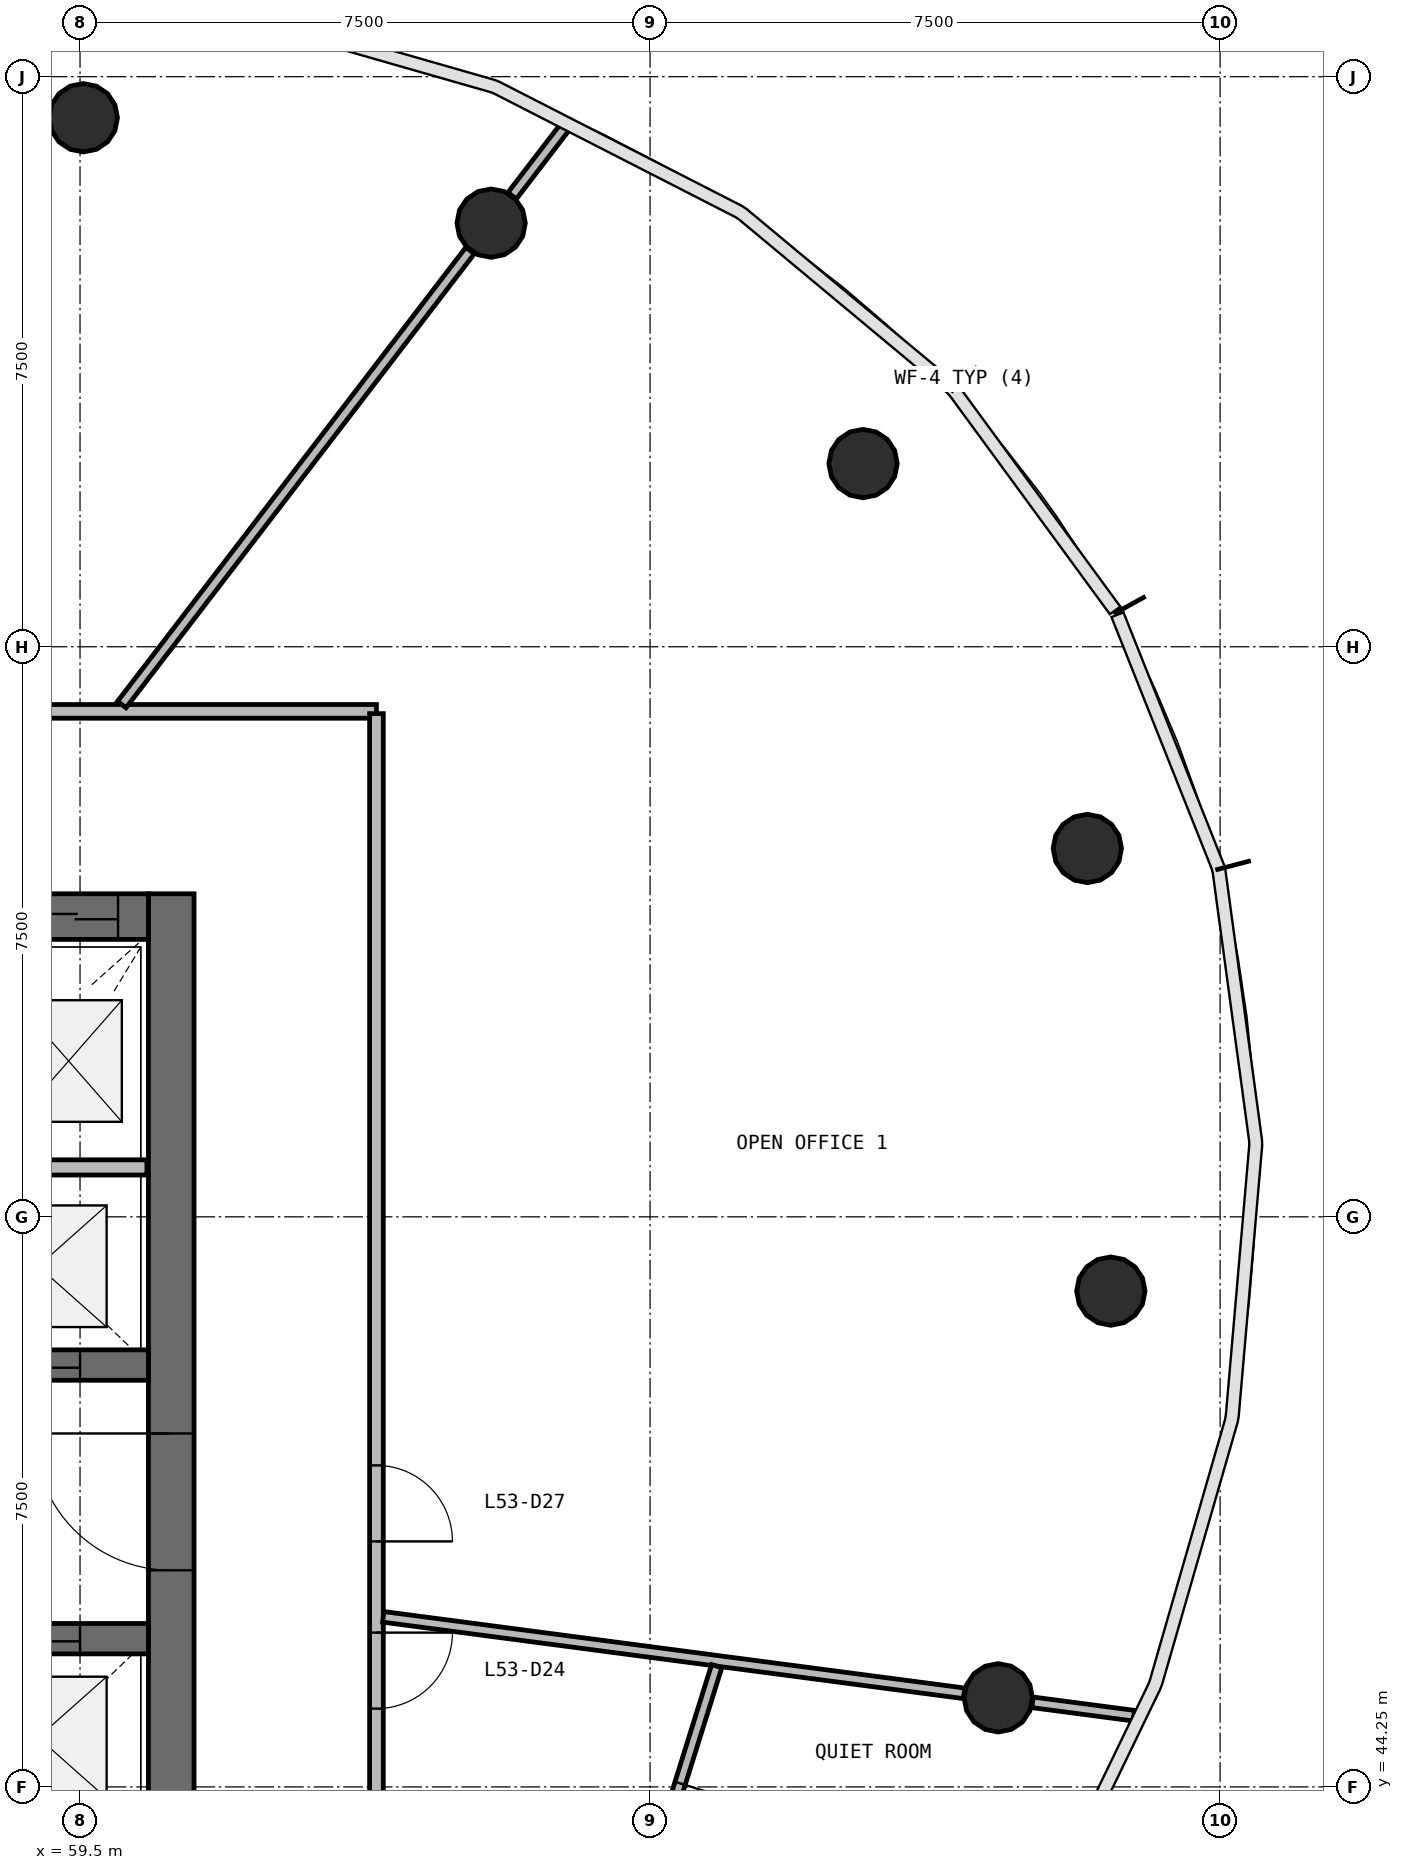
"""IFC4 building model, lengths in metres.
Left out: names, types, materials, properties, quantities, classifications, styles, units other than length and angle.
Written with IfcOpenShell. Run it as: python <this file> out.ifc"""

import sys

from ifc_helpers import new_model, si_unit, direction, frame, frame_2d, origin, origin_2d, place, context, subcontext, project, spatial, rectangle, circle, extrude, source, transform, mapped, element, fill, save


model = new_model("IFC4")
c1 = context("Model", 3, precision=1e-05, world=origin(), true_north=direction((0.0, 1.0)))
c2 = subcontext(c1, "Body", "Model", "MODEL_VIEW")
j1 = project(units=[si_unit("LENGTHUNIT", "METRE"), si_unit("PLANEANGLEUNIT", "RADIAN")], contexts=[c1])
p1 = place(None, origin())
s1 = spatial("IfcSite", under=j1, at=p1, CompositionType="ELEMENT")
p2 = place(p1, origin())
s2 = spatial("IfcBuilding", under=s1, at=p2, CompositionType="ELEMENT")
p3 = place(p2, frame((0.0, 0.0, 218.9)))
s3 = spatial("IfcBuildingStorey", under=s2, at=p3, CompositionType="ELEMENT", Elevation=218.9)
p4 = place(p3, frame((60.7, 40.0, 0.0), z_axis=(0.0, 0.0, 1.0), x_axis=(0.0, 1.0, 0.0)))
e1 = element("IfcWall", 1, at=p4, inside=s3, PredefinedType="SHEAR", context=c2, shape_type="SweptSolid", body=[
    extrude(rectangle(XDim=16.0, YDim=0.6, at=frame_2d((8.0, 0.0))), origin(), (0.0, 0.0, 1.0), 3.9),
])
p5 = place(p4, frame((7.1, 0.0, 0.0)))
e2 = element("IfcOpeningElement", 2, at=p5, cuts=e1, PredefinedType="OPENING", context=c2, shape_type="SweptSolid", body=[
    extrude(rectangle(XDim=1.8, YDim=2.1, at=frame_2d((0.9, 1.05))), frame((0.0, 0.31, 0.0), z_axis=(0.0, -1.0, 0.0), x_axis=(1.0, 0.0, 0.0)), (0.0, 0.0, 1.0), 0.62),
])
p6 = place(p3, frame((60.4, 55.7, 0.0), z_axis=(0.0, 0.0, 1.0), x_axis=(-1.0, 0.0, 0.0)))
e3 = element("IfcWall", 3, at=p6, inside=s3, PredefinedType="SHEAR", context=c2, shape_type="SweptSolid", body=[
    extrude(rectangle(XDim=16.8, YDim=0.6, at=frame_2d((8.4, 0.0))), origin(), (0.0, 0.0, 1.0), 3.9),
])
p7 = place(p6, frame((0.4, 0.0, 0.0)))
e4 = element("IfcOpeningElement", 4, at=p7, cuts=e3, PredefinedType="OPENING", context=c2, shape_type="SweptSolid", body=[
    extrude(rectangle(XDim=1.1, YDim=2.1, at=frame_2d((0.55, 1.05))), frame((0.0, 0.31, 0.0), z_axis=(0.0, -1.0, 0.0), x_axis=(1.0, 0.0, 0.0)), (0.0, 0.0, 1.0), 0.62),
])
p8 = place(p6, frame((10.3, 0.0, 0.0)))
e5 = element("IfcOpeningElement", 5, at=p8, cuts=e3, PredefinedType="OPENING", context=c2, shape_type="SweptSolid", body=[
    extrude(rectangle(XDim=1.2, YDim=2.1, at=frame_2d((0.6, 1.05))), frame((0.0, 0.31, 0.0), z_axis=(0.0, -1.0, 0.0), x_axis=(1.0, 0.0, 0.0)), (0.0, 0.0, 1.0), 0.62),
])
p9 = place(p6, frame((7.25, 0.0, 0.0)))
e6 = element("IfcOpeningElement", 6, at=p9, cuts=e3, PredefinedType="OPENING", context=c2, shape_type="SweptSolid", body=[
    extrude(rectangle(XDim=1.1, YDim=2.1, at=frame_2d((0.55, 1.05))), frame((0.0, 0.31, 0.0), z_axis=(0.0, -1.0, 0.0), x_axis=(1.0, 0.0, 0.0)), (0.0, 0.0, 1.0), 0.62),
])
p10 = place(p3, frame((43.6, 49.8, 0.0), z_axis=(0.0, 0.0, 1.0), x_axis=(1.0, 0.0, 0.0)))
e7 = element("IfcWall", 7, at=p10, inside=s3, PredefinedType="SHEAR", context=c2, shape_type="SweptSolid", body=[
    extrude(rectangle(XDim=16.8, YDim=0.4, at=frame_2d((8.4, 0.0))), origin(), (0.0, 0.0, 1.0), 3.9),
])
p11 = place(p10, frame((9.8, 0.0, 0.0)))
e8 = element("IfcOpeningElement", 8, at=p11, cuts=e7, PredefinedType="OPENING", context=c2, shape_type="SweptSolid", body=[
    extrude(rectangle(XDim=1.1, YDim=2.1, at=frame_2d((0.55, 1.05))), frame((0.0, 0.21, 0.0), z_axis=(0.0, -1.0, 0.0), x_axis=(1.0, 0.0, 0.0)), (0.0, 0.0, 1.0), 0.42),
])
p12 = place(p10, frame((12.3, 0.0, 0.0)))
e9 = element("IfcOpeningElement", 9, at=p12, cuts=e7, PredefinedType="OPENING", context=c2, shape_type="SweptSolid", body=[
    extrude(rectangle(XDim=1.1, YDim=2.1, at=frame_2d((0.55, 1.05))), frame((0.0, 0.21, 0.0), z_axis=(0.0, -1.0, 0.0), x_axis=(1.0, 0.0, 0.0)), (0.0, 0.0, 1.0), 0.42),
])
p13 = place(p10, frame((14.8, 0.0, 0.0)))
e10 = element("IfcOpeningElement", 10, at=p13, cuts=e7, PredefinedType="OPENING", context=c2, shape_type="SweptSolid", body=[
    extrude(rectangle(XDim=1.1, YDim=2.1, at=frame_2d((0.55, 1.05))), frame((0.0, 0.21, 0.0), z_axis=(0.0, -1.0, 0.0), x_axis=(1.0, 0.0, 0.0)), (0.0, 0.0, 1.0), 0.42),
])
p14 = place(p10, frame((2.05, 0.0, 0.0)))
e11 = element("IfcOpeningElement", 11, at=p14, cuts=e7, PredefinedType="OPENING", context=c2, shape_type="SweptSolid", body=[
    extrude(rectangle(XDim=0.9, YDim=2.1, at=frame_2d((0.45, 1.05))), frame((0.0, 0.21, 0.0), z_axis=(0.0, -1.0, 0.0), x_axis=(1.0, 0.0, 0.0)), (0.0, 0.0, 1.0), 0.42),
])
p15 = place(p10, frame((5.25, 0.0, 0.0)))
e12 = element("IfcOpeningElement", 12, at=p15, cuts=e7, PredefinedType="OPENING", context=c2, shape_type="SweptSolid", body=[
    extrude(rectangle(XDim=0.9, YDim=2.1, at=frame_2d((0.45, 1.05))), frame((0.0, 0.21, 0.0), z_axis=(0.0, -1.0, 0.0), x_axis=(1.0, 0.0, 0.0)), (0.0, 0.0, 1.0), 0.42),
])
p16 = place(p10, frame((7.85, 0.0, 0.0)))
e13 = element("IfcOpeningElement", 13, at=p16, cuts=e7, PredefinedType="OPENING", context=c2, shape_type="SweptSolid", body=[
    extrude(rectangle(XDim=0.9, YDim=2.1, at=frame_2d((0.45, 1.05))), frame((0.0, 0.21, 0.0), z_axis=(0.0, -1.0, 0.0), x_axis=(1.0, 0.0, 0.0)), (0.0, 0.0, 1.0), 0.42),
])
p17 = place(p3, frame((43.6, 46.2, 0.0), z_axis=(0.0, 0.0, 1.0), x_axis=(1.0, 0.0, 0.0)))
e14 = element("IfcWall", 14, at=p17, inside=s3, PredefinedType="SHEAR", context=c2, shape_type="SweptSolid", body=[
    extrude(rectangle(XDim=16.8, YDim=0.4, at=frame_2d((8.4, 0.0))), origin(), (0.0, 0.0, 1.0), 3.9),
])
p18 = place(p17, frame((9.8, 0.0, 0.0)))
e15 = element("IfcOpeningElement", 15, at=p18, cuts=e14, PredefinedType="OPENING", context=c2, shape_type="SweptSolid", body=[
    extrude(rectangle(XDim=1.1, YDim=2.1, at=frame_2d((0.55, 1.05))), frame((0.0, 0.21, 0.0), z_axis=(0.0, -1.0, 0.0), x_axis=(1.0, 0.0, 0.0)), (0.0, 0.0, 1.0), 0.42),
])
p19 = place(p17, frame((12.3, 0.0, 0.0)))
e16 = element("IfcOpeningElement", 16, at=p19, cuts=e14, PredefinedType="OPENING", context=c2, shape_type="SweptSolid", body=[
    extrude(rectangle(XDim=1.1, YDim=2.1, at=frame_2d((0.55, 1.05))), frame((0.0, 0.21, 0.0), z_axis=(0.0, -1.0, 0.0), x_axis=(1.0, 0.0, 0.0)), (0.0, 0.0, 1.0), 0.42),
])
p20 = place(p17, frame((14.8, 0.0, 0.0)))
e17 = element("IfcOpeningElement", 17, at=p20, cuts=e14, PredefinedType="OPENING", context=c2, shape_type="SweptSolid", body=[
    extrude(rectangle(XDim=1.1, YDim=2.1, at=frame_2d((0.55, 1.05))), frame((0.0, 0.21, 0.0), z_axis=(0.0, -1.0, 0.0), x_axis=(1.0, 0.0, 0.0)), (0.0, 0.0, 1.0), 0.42),
])
p21 = place(p17, frame((3.45, 0.0, 0.0)))
e18 = element("IfcOpeningElement", 18, at=p21, cuts=e14, PredefinedType="OPENING", context=c2, shape_type="SweptSolid", body=[
    extrude(rectangle(XDim=0.9, YDim=2.1, at=frame_2d((0.45, 1.05))), frame((0.0, 0.21, 0.0), z_axis=(0.0, -1.0, 0.0), x_axis=(1.0, 0.0, 0.0)), (0.0, 0.0, 1.0), 0.42),
])
p22 = place(p17, frame((7.85, 0.0, 0.0)))
e19 = element("IfcOpeningElement", 19, at=p22, cuts=e14, PredefinedType="OPENING", context=c2, shape_type="SweptSolid", body=[
    extrude(rectangle(XDim=0.9, YDim=2.1, at=frame_2d((0.45, 1.05))), frame((0.0, 0.21, 0.0), z_axis=(0.0, -1.0, 0.0), x_axis=(1.0, 0.0, 0.0)), (0.0, 0.0, 1.0), 0.42),
])
m1 = source(origin(), c2, "Body", "SweptSolid", [
    extrude(circle(Radius=0.45, at=origin_2d()), origin(), (0.0, 0.0, 1.0), 3.9),
])
for number, where, z_axis, x_axis in (
    (20, (73.062, 50.773, 0.0), (0.0, 0.0, 1.0), (1.0, 0.0, 0.0)),
    (21, (72.753, 56.596, 0.0), (0.0, 0.0, 1.0), (1.0, 0.0, 0.0)),
    (22, (69.802, 61.66, 0.0), (0.0, 0.0, 1.0), (1.0, 0.0, 0.0)),
    (23, (64.909, 64.823, 0.0), (0.0, 0.0, 1.0), (1.0, 0.0, 0.0)),
    (24, (59.543, 66.21, 0.0), (0.0, 0.0, 1.0), (1.0, 0.0, 0.0)),
    (25, (71.581, 45.422, 0.0), (0.0, 0.0, 1.0), (1.0, 0.0, 0.0)),
):
    element("IfcColumn", number, at=place(p3, frame(where, z_axis=z_axis, x_axis=x_axis)), inside=s3, PredefinedType="COLUMN", context=c2, shape_type="MappedRepresentation", body=[
        mapped(m1, transform((0.0, 0.0, 0.0), scale=1.0)),
    ])
p23 = place(p3, frame((60.38, 52.4, 0.0), z_axis=(0.0, 0.0, 1.0), x_axis=(-1.0, 0.0, 0.0)))
e26 = element("IfcWall", 26, at=p23, inside=s3, PredefinedType="SOLIDWALL", context=c2, shape_type="SweptSolid", body=[
    extrude(rectangle(XDim=1.85, YDim=0.2, at=frame_2d((0.925, 0.0))), origin(), (0.0, 0.0, 1.0), 3.58),
])
p24 = place(p3, frame((40.6, 58.4, 0.0), z_axis=(0.0, 0.0, 1.0), x_axis=(1.0, 0.0, 0.0)))
e27 = element("IfcWall", 27, at=p24, inside=s3, PredefinedType="PARTITIONING", context=c2, shape_type="SweptSolid", body=[
    extrude(rectangle(XDim=22.8, YDim=0.18, at=frame_2d((11.4, 0.0))), origin(), (0.0, 0.0, 1.0), 2.88),
])
p25 = place(p24, frame((10.95, 0.0, 0.0)))
e28 = element("IfcOpeningElement", 28, at=p25, cuts=e27, PredefinedType="OPENING", context=c2, shape_type="SweptSolid", body=[
    extrude(rectangle(XDim=1.0, YDim=2.1, at=frame_2d((0.5, 1.05))), frame((0.0, 0.1, 0.0), z_axis=(0.0, -1.0, 0.0), x_axis=(1.0, 0.0, 0.0)), (0.0, 0.0, 1.0), 0.2),
])
p26 = place(p24, frame((8.75, 0.0, 0.0)))
e29 = element("IfcOpeningElement", 29, at=p26, cuts=e27, PredefinedType="OPENING", context=c2, shape_type="SweptSolid", body=[
    extrude(rectangle(XDim=1.0, YDim=2.1, at=frame_2d((0.5, 1.05))), frame((0.0, 0.1, 0.0), z_axis=(0.0, -1.0, 0.0), x_axis=(1.0, 0.0, 0.0)), (0.0, 0.0, 1.0), 0.2),
])
p27 = place(p3, frame((63.4, 58.37, 0.0), z_axis=(0.0, 0.0, 1.0), x_axis=(0.0, -1.0, 0.0)))
e30 = element("IfcWall", 30, at=p27, inside=s3, PredefinedType="PARTITIONING", context=c2, shape_type="SweptSolid", body=[
    extrude(rectangle(XDim=20.74, YDim=0.18, at=frame_2d((10.37, 0.0))), origin(), (0.0, 0.0, 1.0), 2.88),
])
p28 = place(p27, frame((12.09, 0.0, 0.0)))
e31 = element("IfcOpeningElement", 31, at=p28, cuts=e30, PredefinedType="OPENING", context=c2, shape_type="SweptSolid", body=[
    extrude(rectangle(XDim=1.0, YDim=2.1, at=frame_2d((0.5, 1.05))), frame((0.0, 0.1, 0.0), z_axis=(0.0, -1.0, 0.0), x_axis=(1.0, 0.0, 0.0)), (0.0, 0.0, 1.0), 0.2),
])
p29 = place(p27, frame((9.89, 0.0, 0.0)))
e32 = element("IfcOpeningElement", 32, at=p29, cuts=e30, PredefinedType="OPENING", context=c2, shape_type="SweptSolid", body=[
    extrude(rectangle(XDim=1.0, YDim=2.1, at=frame_2d((0.5, 1.05))), frame((0.0, 0.1, 0.0), z_axis=(0.0, -1.0, 0.0), x_axis=(1.0, 0.0, 0.0)), (0.0, 0.0, 1.0), 0.2),
])
p30 = place(p3, frame((71.13, 45.481, 0.0), z_axis=(0.0, 0.0, 1.0), x_axis=(-0.991445127496, 0.130524170803, 0.0)))
e33 = element("IfcWall", 33, at=p30, inside=s3, PredefinedType="PARTITIONING", context=c2, shape_type="SweptSolid", body=[
    extrude(rectangle(XDim=7.706, YDim=0.14, at=frame_2d((3.853, 0.0))), origin(), (0.0, 0.0, 1.0), 2.88),
])
p31 = place(p3, frame((60.049, 58.49, 0.0), z_axis=(0.0, 0.0, 1.0), x_axis=(0.608758977351, 0.793355221508, 0.0)))
e34 = element("IfcWall", 34, at=p31, inside=s3, PredefinedType="PARTITIONING", context=c2, shape_type="SweptSolid", body=[
    extrude(rectangle(XDim=7.528, YDim=0.14, at=frame_2d((3.764, 0.0))), origin(), (0.0, 0.0, 1.0), 2.88),
])
p32 = place(p3, frame((67.877, 45.839, 0.0), z_axis=(0.0, 0.0, 1.0), x_axis=(-0.298230548624, -0.954493865809, 0.0)))
e35 = element("IfcWall", 35, at=p32, inside=s3, PredefinedType="PARTITIONING", context=c2, shape_type="SweptSolid", body=[
    extrude(rectangle(XDim=4.066, YDim=0.14, at=frame_2d((2.033, 0.0))), origin(), (0.0, 0.0, 1.0), 2.88),
])
p33 = place(p32, frame((1.616, 0.0, 0.0)))
e36 = element("IfcOpeningElement", 36, at=p33, cuts=e35, PredefinedType="OPENING", context=c2, shape_type="SweptSolid", body=[
    extrude(rectangle(XDim=1.0, YDim=2.1, at=frame_2d((0.5, 1.05))), frame((0.0, 0.08, 0.0), z_axis=(0.0, -1.0, 0.0), x_axis=(1.0, 0.0, 0.0)), (0.0, 0.0, 1.0), 0.16),
])
p34 = place(p3, frame((72.031, 45.363, 0.0), z_axis=(0.0, 0.0, 1.0), x_axis=(0.991446880033, -0.130510858064, 0.0)))
e37 = element("IfcWall", 37, at=p34, inside=s3, PredefinedType="PARTITIONING", context=c2, shape_type="SweptSolid", body=[
    extrude(rectangle(XDim=1.345, YDim=0.14, at=frame_2d((0.672, 0.0))), origin(), (0.0, 0.0, 1.0), 2.88),
])
p35 = place(p3, frame((65.186, 65.184, 0.0), z_axis=(0.0, 0.0, 1.0), x_axis=(0.608692390952, 0.793406310283, 0.0)))
e38 = element("IfcWall", 38, at=p35, inside=s3, PredefinedType="PARTITIONING", context=c2, shape_type="SweptSolid", body=[
    extrude(rectangle(XDim=1.159, YDim=0.14, at=frame_2d((0.58, 0.0))), origin(), (0.0, 0.0, 1.0), 2.88),
])
m2 = source(origin(), c2, "Body", "SweptSolid", [
    extrude(rectangle(XDim=1.8, YDim=2.1, at=frame_2d((0.9, 1.05))), frame((0.0, 0.025, 0.0), z_axis=(0.0, -1.0, 0.0), x_axis=(1.0, 0.0, 0.0)), (0.0, 0.0, 1.0), 0.05),
])
p36 = place(p5, origin())
e39 = element("IfcDoor", 39, at=p36, inside=s3, OperationType="SINGLE_SWING_RIGHT", PredefinedType="DOOR", context=c2, shape_type="MappedRepresentation", body=[
    mapped(m2, transform((0.0, 0.0, 0.0), scale=1.0)),
])
fill(e2, e39)
m3 = source(origin(), c2, "Body", "SweptSolid", [
    extrude(rectangle(XDim=1.1, YDim=2.1, at=frame_2d((0.55, 1.05))), frame((0.0, 0.025, 0.0), z_axis=(0.0, -1.0, 0.0), x_axis=(1.0, 0.0, 0.0)), (0.0, 0.0, 1.0), 0.05),
])
p37 = place(p13, origin())
e40 = element("IfcDoor", 40, at=p37, inside=s3, OperationType="DOUBLE_DOOR_SLIDING", PredefinedType="USERDEFINED", context=c2, shape_type="MappedRepresentation", body=[
    mapped(m3, transform((0.0, 0.0, 0.0), scale=1.0)),
])
fill(e10, e40)
p38 = place(p20, origin())
e41 = element("IfcDoor", 41, at=p38, inside=s3, OperationType="DOUBLE_DOOR_SLIDING", PredefinedType="USERDEFINED", context=c2, shape_type="MappedRepresentation", body=[
    mapped(m3, transform((0.0, 0.0, 0.0), scale=1.0)),
])
fill(e17, e41)
p39 = place(p7, origin())
e42 = element("IfcDoor", 42, at=p39, inside=s3, OperationType="DOUBLE_DOOR_SLIDING", PredefinedType="USERDEFINED", context=c2, shape_type="MappedRepresentation", body=[
    mapped(m3, transform((0.0, 0.0, 0.0), scale=1.0)),
])
fill(e4, e42)
m4 = source(origin(), c2, "Body", "SweptSolid", [
    extrude(rectangle(XDim=1.0, YDim=2.1, at=frame_2d((0.5, 1.05))), frame((0.0, 0.025, 0.0), z_axis=(0.0, -1.0, 0.0), x_axis=(1.0, 0.0, 0.0)), (0.0, 0.0, 1.0), 0.05),
])
p40 = place(p28, origin())
e43 = element("IfcDoor", 43, at=p40, inside=s3, OperationType="SINGLE_SWING_LEFT", PredefinedType="DOOR", context=c2, shape_type="MappedRepresentation", body=[
    mapped(m4, transform((0.0, 0.0, 0.0), scale=1.0)),
])
fill(e31, e43)
p41 = place(p33, origin())
e44 = element("IfcDoor", 44, at=p41, inside=s3, OperationType="SINGLE_SWING_LEFT", PredefinedType="DOOR", context=c2, shape_type="MappedRepresentation", body=[
    mapped(m4, transform((0.0, 0.0, 0.0), scale=1.0)),
])
fill(e36, e44)
p42 = place(p29, origin())
e45 = element("IfcDoor", 45, at=p42, inside=s3, OperationType="SINGLE_SWING_RIGHT", PredefinedType="DOOR", context=c2, shape_type="MappedRepresentation", body=[
    mapped(m4, transform((0.0, 0.0, 0.0), scale=1.0)),
])
fill(e32, e45)
save(model, sys.argv[1])
